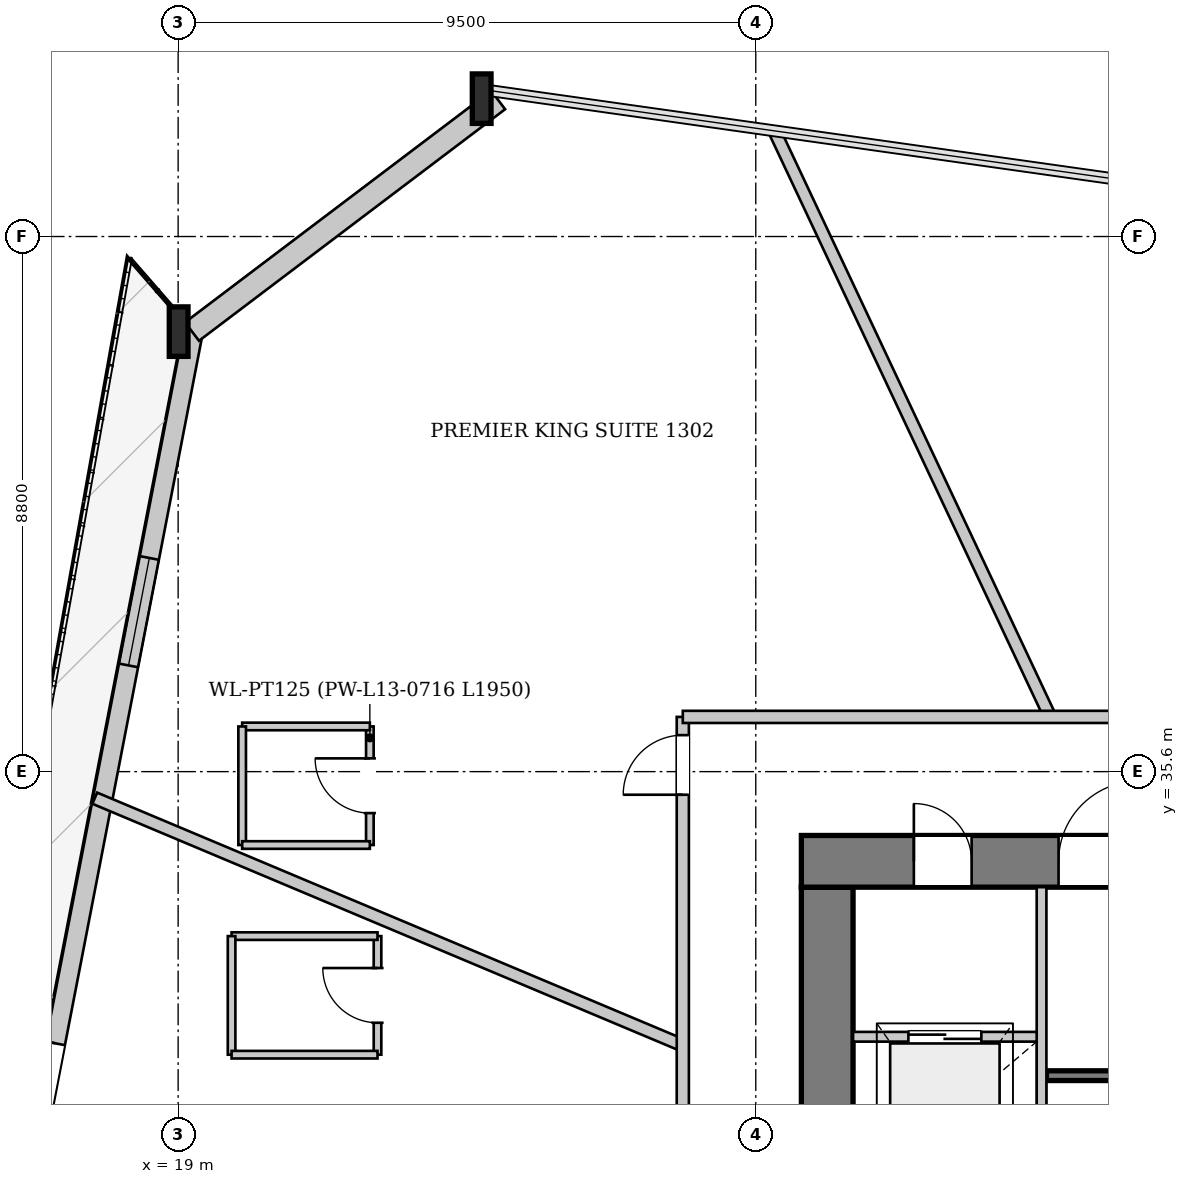
"""IFC4 building model, lengths in metres.
Left out: names, types, materials, properties, quantities, classifications, styles, units other than length and angle.
Written with IfcOpenShell. Run it as: python <this file> out.ifc"""

import sys

from ifc_helpers import new_model, si_unit, direction, frame, frame_2d, origin, origin_2d, place, context, subcontext, project, spatial, rectangle, i_section, extrude, source, transform, mapped, element, fill, save


model = new_model("IFC4")
c1 = context("Model", 3, precision=1e-05, world=origin(), true_north=direction((0.0, 1.0)))
c2 = subcontext(c1, "Body", "Model", "MODEL_VIEW")
j1 = project(units=[si_unit("LENGTHUNIT", "METRE"), si_unit("PLANEANGLEUNIT", "RADIAN")], contexts=[c1])
p1 = place(None, origin())
s1 = spatial("IfcSite", under=j1, at=p1, CompositionType="ELEMENT")
p2 = place(p1, origin())
s2 = spatial("IfcBuilding", under=s1, at=p2, CompositionType="ELEMENT")
p3 = place(p2, frame((0.0, 0.0, 54.15)))
s3 = spatial("IfcBuildingStorey", under=s2, at=p3, CompositionType="ELEMENT", Elevation=54.15)
m1 = source(origin(), c2, "Body", "SweptSolid", [
    extrude(i_section(OverallWidth=0.308, OverallDepth=0.814, WebThickness=0.021, FlangeThickness=0.04, at=origin_2d()), origin(), (0.0, 0.0, 1.0), 3.409),
])
p4 = place(p3, frame((24.148, 46.796, 0.0), z_axis=(-0.091734158476, -0.075836435461, 0.992891574758), x_axis=(0.637161279801, -0.77073049993, 0.0)))
e1 = element("IfcColumn", 1, at=p4, inside=s3, PredefinedType="COLUMN", context=c2, shape_type="MappedRepresentation", body=[
    mapped(m1, transform((0.0, 0.0, 0.0), x_axis=(1.0, 0.0, 0.0), y_axis=(0.0, 1.0, 0.0), z_axis=(0.0, 0.0, 1.0), scale=1.0)),
])
m2 = source(origin(), c2, "Body", "SweptSolid", [
    extrude(i_section(OverallWidth=0.308, OverallDepth=0.814, WebThickness=0.021, FlangeThickness=0.04, at=origin_2d()), origin(), (0.0, 0.0, 1.0), 3.405),
])
p5 = place(p3, frame((19.114, 42.988, 0.0), z_axis=(-0.061873656803, -0.08947662073, 0.994065181433), x_axis=(0.822500508627, -0.568764374155, 0.0)))
e2 = element("IfcColumn", 2, at=p5, inside=s3, PredefinedType="COLUMN", context=c2, shape_type="MappedRepresentation", body=[
    mapped(m2, transform((0.0, 0.0, 0.0), x_axis=(1.0, 0.0, 0.0), y_axis=(0.0, 1.0, 0.0), z_axis=(0.0, 0.0, 1.0), scale=1.0)),
])
p6 = place(p3, frame((15.75, 24.773, 0.0), z_axis=(0.0, 0.0, 1.0), x_axis=(0.19010756161, 0.981763268318, 0.0)))
e3 = element("IfcWall", 3, at=p6, inside=s3, PredefinedType="SOLIDWALL", context=c2, shape_type="SweptSolid", body=[
    extrude(rectangle(XDim=18.522, YDim=0.32, at=frame_2d((9.261, 0.0))), origin(), (0.0, 0.0, 1.0), 2.592),
])
p7 = place(p6, frame((5.377, 0.0, 0.0)))
e4 = element("IfcOpeningElement", 4, at=p7, cuts=e3, PredefinedType="OPENING", context=c2, shape_type="SweptSolid", body=[
    extrude(rectangle(XDim=1.1, YDim=2.3, at=frame_2d((0.55, 1.15))), frame((0.0, 0.17, 0.0), z_axis=(0.0, -1.0, 0.0), x_axis=(1.0, 0.0, 0.0)), (0.0, 0.0, 1.0), 0.34),
])
p8 = place(p6, frame((12.807, 0.0, 0.272)))
e5 = element("IfcOpeningElement", 5, at=p8, cuts=e3, PredefinedType="OPENING", context=c2, shape_type="SweptSolid", body=[
    extrude(rectangle(XDim=1.8, YDim=2.2, at=frame_2d((0.9, 1.1))), frame((0.0, 0.17, 0.0), z_axis=(0.0, -1.0, 0.0), x_axis=(1.0, 0.0, 0.0)), (0.0, 0.0, 1.0), 0.34),
])
p9 = place(p3, frame((19.228, 42.837, 0.0), z_axis=(0.0, 0.0, 1.0), x_axis=(0.797566297219, 0.6032313002, 0.0)))
e6 = element("IfcWall", 6, at=p9, inside=s3, PredefinedType="SOLIDWALL", context=c2, shape_type="SweptSolid", body=[
    extrude(rectangle(XDim=6.313, YDim=0.38, at=frame_2d((3.156, 0.0))), origin(), (0.0, 0.0, 1.0), 2.592),
])
p10 = place(p3, frame((29.675, 19.5, 0.0), z_axis=(0.0, 0.0, 1.0), x_axis=(0.0, 1.0, 0.0)))
e7 = element("IfcWall", 7, at=p10, inside=s3, PredefinedType="SHEAR", context=c2, shape_type="SweptSolid", body=[
    extrude(rectangle(XDim=14.2, YDim=0.85, at=frame_2d((7.1, 0.0))), origin(), (0.0, 0.0, 1.0), 3.3),
])
p11 = place(p10, frame((7.42, 0.0, 0.0)))
e8 = element("IfcOpeningElement", 8, at=p11, cuts=e7, PredefinedType="OPENING", context=c2, shape_type="SweptSolid", body=[
    extrude(rectangle(XDim=1.6, YDim=2.2, at=frame_2d((0.8, 1.1))), frame((0.0, 0.435, 0.0), z_axis=(0.0, -1.0, 0.0), x_axis=(1.0, 0.0, 0.0)), (0.0, 0.0, 1.0), 0.87),
])
p12 = place(p3, frame((29.25, 34.125, 0.0), z_axis=(0.0, 0.0, 1.0), x_axis=(1.0, 0.0, 0.0)))
e9 = element("IfcWall", 9, at=p12, inside=s3, PredefinedType="SHEAR", context=c2, shape_type="SweptSolid", body=[
    extrude(rectangle(XDim=17.5, YDim=0.85, at=frame_2d((8.75, 0.0))), origin(), (0.0, 0.0, 1.0), 3.3),
])
p13 = place(p12, frame((1.85, 0.0, 0.0)))
e10 = element("IfcOpeningElement", 10, at=p13, cuts=e9, PredefinedType="OPENING", context=c2, shape_type="SweptSolid", body=[
    extrude(rectangle(XDim=0.95, YDim=2.1, at=frame_2d((0.475, 1.05))), frame((0.0, 0.435, 0.0), z_axis=(0.0, -1.0, 0.0), x_axis=(1.0, 0.0, 0.0)), (0.0, 0.0, 1.0), 0.87),
])
p14 = place(p12, frame((4.23, 0.0, 0.0)))
e11 = element("IfcOpeningElement", 11, at=p14, cuts=e9, PredefinedType="OPENING", context=c2, shape_type="SweptSolid", body=[
    extrude(rectangle(XDim=1.32, YDim=2.2, at=frame_2d((0.66, 1.1))), frame((0.0, 0.435, 0.0), z_axis=(0.0, -1.0, 0.0), x_axis=(1.0, 0.0, 0.0)), (0.0, 0.0, 1.0), 0.87),
])
p15 = place(p12, frame((15.3, 0.0, 0.0)))
e12 = element("IfcOpeningElement", 12, at=p15, cuts=e9, PredefinedType="OPENING", context=c2, shape_type="SweptSolid", body=[
    extrude(rectangle(XDim=0.95, YDim=2.1, at=frame_2d((0.475, 1.05))), frame((0.0, 0.435, 0.0), z_axis=(0.0, -1.0, 0.0), x_axis=(1.0, 0.0, 0.0)), (0.0, 0.0, 1.0), 0.87),
])
p16 = place(p3, frame((33.28, 30.6, 0.0), z_axis=(0.0, 0.0, 1.0), x_axis=(1.0, 0.0, 0.0)))
e13 = element("IfcWall", 13, at=p16, inside=s3, PredefinedType="PARTITIONING", context=c2, shape_type="SweptSolid", body=[
    extrude(rectangle(XDim=7.3, YDim=0.16, at=frame_2d((3.65, 0.0))), origin(), (0.0, 0.0, 1.0), 3.3),
])
p17 = place(p3, frame((33.2, 28.44, 0.0), z_axis=(0.0, 0.0, 1.0), x_axis=(0.0, 1.0, 0.0)))
e14 = element("IfcWall", 14, at=p17, inside=s3, PredefinedType="PARTITIONING", context=c2, shape_type="SweptSolid", body=[
    extrude(rectangle(XDim=5.26, YDim=0.16, at=frame_2d((2.63, 0.0))), origin(), (0.0, 0.0, 1.0), 3.3),
])
p18 = place(p3, frame((30.1, 31.24, 0.0), z_axis=(0.0, 0.0, 1.0), x_axis=(1.0, 0.0, 0.0)))
e15 = element("IfcWall", 15, at=p18, inside=s3, PredefinedType="PARTITIONING", context=c2, shape_type="SweptSolid", body=[
    extrude(rectangle(XDim=3.02, YDim=0.16, at=frame_2d((1.51, 0.0))), origin(), (0.0, 0.0, 1.0), 3.3),
])
p19 = place(p18, frame((0.91, 0.0, 0.0)))
e16 = element("IfcOpeningElement", 16, at=p19, cuts=e15, PredefinedType="OPENING", context=c2, shape_type="SweptSolid", body=[
    extrude(rectangle(XDim=1.2, YDim=2.2, at=frame_2d((0.6, 1.1))), frame((0.0, 0.09, 0.0), z_axis=(0.0, -1.0, 0.0), x_axis=(1.0, 0.0, 0.0)), (0.0, 0.0, 1.0), 0.18),
])
p20 = place(p3, frame((33.341, 36.5, 0.0), z_axis=(0.0, 0.0, 1.0), x_axis=(-0.425771561882, 0.904830689738, 0.0)))
e17 = element("IfcWall", 17, at=p20, inside=s3, PredefinedType="PARTITIONING", context=c2, shape_type="SweptSolid", body=[
    extrude(rectangle(XDim=10.615, YDim=0.2, at=frame_2d((5.308, 0.0))), origin(), (0.0, 0.0, 1.0), 3.3),
])
p21 = place(p3, frame((27.3, 31.098, 0.0), z_axis=(0.0, 0.0, 1.0), x_axis=(-0.92186956873, 0.387500320322, 0.0)))
e18 = element("IfcWall", 18, at=p21, inside=s3, PredefinedType="PARTITIONING", context=c2, shape_type="SweptSolid", body=[
    extrude(rectangle(XDim=10.491, YDim=0.2, at=frame_2d((5.245, 0.0))), origin(), (0.0, 0.0, 1.0), 3.3),
])
p22 = place(p3, frame((22.153, 34.393, 0.0), z_axis=(0.0, 0.0, 1.0), x_axis=(0.0, 1.0, 0.0)))
e19 = element("IfcWall", 19, at=p22, inside=s3, PredefinedType="PARTITIONING", context=c2, shape_type="SweptSolid", body=[
    extrude(rectangle(XDim=1.95, YDim=0.125, at=frame_2d((0.975, 0.0))), origin(), (0.0, 0.0, 1.0), 3.3),
])
p23 = place(p22, frame((0.525, 0.0, 0.0)))
e20 = element("IfcOpeningElement", 20, at=p23, cuts=e19, PredefinedType="OPENING", context=c2, shape_type="SweptSolid", body=[
    extrude(rectangle(XDim=0.9, YDim=2.1, at=frame_2d((0.45, 1.05))), frame((0.0, 0.073, 0.0), z_axis=(0.0, -1.0, 0.0), x_axis=(1.0, 0.0, 0.0)), (0.0, 0.0, 1.0), 0.145),
])
p24 = place(p3, frame((22.153, 36.343, 0.0), z_axis=(0.0, 0.0, 1.0), x_axis=(-1.0, 0.0, 0.0)))
e21 = element("IfcWall", 21, at=p24, inside=s3, PredefinedType="PARTITIONING", context=c2, shape_type="SweptSolid", body=[
    extrude(rectangle(XDim=2.1, YDim=0.125, at=frame_2d((1.05, 0.0))), origin(), (0.0, 0.0, 1.0), 3.3),
])
p25 = place(p3, frame((20.053, 36.343, 0.0), z_axis=(0.0, 0.0, 1.0), x_axis=(0.0, -1.0, 0.0)))
e22 = element("IfcWall", 22, at=p25, inside=s3, PredefinedType="PARTITIONING", context=c2, shape_type="SweptSolid", body=[
    extrude(rectangle(XDim=1.95, YDim=0.125, at=frame_2d((0.975, 0.0))), origin(), (0.0, 0.0, 1.0), 3.3),
])
p26 = place(p3, frame((20.053, 34.393, 0.0), z_axis=(0.0, 0.0, 1.0), x_axis=(1.0, 0.0, 0.0)))
e23 = element("IfcWall", 23, at=p26, inside=s3, PredefinedType="PARTITIONING", context=c2, shape_type="SweptSolid", body=[
    extrude(rectangle(XDim=2.1, YDim=0.125, at=frame_2d((1.05, 0.0))), origin(), (0.0, 0.0, 1.0), 3.3),
])
p27 = place(p3, frame((22.279, 30.945, 0.0), z_axis=(0.0, 0.0, 1.0), x_axis=(0.0, 1.0, 0.0)))
e24 = element("IfcWall", 24, at=p27, inside=s3, PredefinedType="PARTITIONING", context=c2, shape_type="SweptSolid", body=[
    extrude(rectangle(XDim=1.95, YDim=0.125, at=frame_2d((0.975, 0.0))), origin(), (0.0, 0.0, 1.0), 3.045),
])
p28 = place(p27, frame((0.525, 0.0, 0.0)))
e25 = element("IfcOpeningElement", 25, at=p28, cuts=e24, PredefinedType="OPENING", context=c2, shape_type="SweptSolid", body=[
    extrude(rectangle(XDim=0.9, YDim=2.1, at=frame_2d((0.45, 1.05))), frame((0.0, 0.073, 0.0), z_axis=(0.0, -1.0, 0.0), x_axis=(1.0, 0.0, 0.0)), (0.0, 0.0, 1.0), 0.145),
])
p29 = place(p3, frame((22.279, 32.895, 0.0), z_axis=(0.0, 0.0, 1.0), x_axis=(-1.0, 0.0, 0.0)))
e26 = element("IfcWall", 26, at=p29, inside=s3, PredefinedType="PARTITIONING", context=c2, shape_type="SweptSolid", body=[
    extrude(rectangle(XDim=2.4, YDim=0.125, at=frame_2d((1.2, 0.0))), origin(), (0.0, 0.0, 1.0), 3.3),
])
p30 = place(p3, frame((19.879, 32.895, 0.0), z_axis=(0.0, 0.0, 1.0), x_axis=(0.0, -1.0, 0.0)))
e27 = element("IfcWall", 27, at=p30, inside=s3, PredefinedType="PARTITIONING", context=c2, shape_type="SweptSolid", body=[
    extrude(rectangle(XDim=1.95, YDim=0.125, at=frame_2d((0.975, 0.0))), origin(), (0.0, 0.0, 1.0), 3.3),
])
p31 = place(p3, frame((19.879, 30.945, 0.0), z_axis=(0.0, 0.0, 1.0), x_axis=(1.0, 0.0, 0.0)))
e28 = element("IfcWall", 28, at=p31, inside=s3, PredefinedType="PARTITIONING", context=c2, shape_type="SweptSolid", body=[
    extrude(rectangle(XDim=2.4, YDim=0.125, at=frame_2d((1.2, 0.0))), origin(), (0.0, 0.0, 1.0), 3.3),
])
p32 = place(p3, frame((27.3, 16.7, 0.0), z_axis=(0.0, 0.0, 1.0), x_axis=(0.0, 1.0, 0.0)))
e29 = element("IfcWall", 29, at=p32, inside=s3, PredefinedType="PARTITIONING", context=c2, shape_type="SweptSolid", body=[
    extrude(rectangle(XDim=19.8, YDim=0.2, at=frame_2d((9.9, 0.0))), origin(), (0.0, 0.0, 1.0), 3.3),
])
p33 = place(p32, frame((18.52, 0.0, 0.0)))
e30 = element("IfcOpeningElement", 30, at=p33, cuts=e29, PredefinedType="OPENING", context=c2, shape_type="SweptSolid", body=[
    extrude(rectangle(XDim=0.98, YDim=2.15, at=frame_2d((0.49, 1.075))), frame((0.0, 0.11, 0.0), z_axis=(0.0, -1.0, 0.0), x_axis=(1.0, 0.0, 0.0)), (0.0, 0.0, 1.0), 0.22),
])
p34 = place(p32, frame((10.654, 0.0, 0.0)))
e31 = element("IfcOpeningElement", 31, at=p34, cuts=e29, PredefinedType="OPENING", context=c2, shape_type="SweptSolid", body=[
    extrude(rectangle(XDim=0.98, YDim=2.15, at=frame_2d((0.49, 1.075))), frame((0.0, 0.11, 0.0), z_axis=(0.0, -1.0, 0.0), x_axis=(1.0, 0.0, 0.0)), (0.0, 0.0, 1.0), 0.22),
])
p35 = place(p3, frame((27.3, 36.5, 0.0), z_axis=(0.0, 0.0, 1.0), x_axis=(1.0, 0.0, 0.0)))
e32 = element("IfcWall", 32, at=p35, inside=s3, PredefinedType="PARTITIONING", context=c2, shape_type="SweptSolid", body=[
    extrude(rectangle(XDim=21.4, YDim=0.2, at=frame_2d((10.7, 0.0))), origin(), (0.0, 0.0, 1.0), 3.3),
])
p36 = place(p35, frame((20.12, 0.0, 0.0)))
e33 = element("IfcOpeningElement", 33, at=p36, cuts=e32, PredefinedType="OPENING", context=c2, shape_type="SweptSolid", body=[
    extrude(rectangle(XDim=0.98, YDim=2.15, at=frame_2d((0.49, 1.075))), frame((0.0, 0.11, 0.0), z_axis=(0.0, -1.0, 0.0), x_axis=(1.0, 0.0, 0.0)), (0.0, 0.0, 1.0), 0.22),
])
m3 = source(origin(), c2, "Body", "SweptSolid", [
    extrude(rectangle(XDim=1.1, YDim=2.3, at=frame_2d((0.55, 1.15))), frame((0.0, 0.025, 0.0), z_axis=(0.0, -1.0, 0.0), x_axis=(1.0, 0.0, 0.0)), (0.0, 0.0, 1.0), 0.05),
])
p37 = place(p7, origin())
e34 = element("IfcDoor", 34, at=p37, inside=s3, OperationType="SINGLE_SWING_RIGHT", PredefinedType="DOOR", context=c2, shape_type="MappedRepresentation", body=[
    mapped(m3, transform((0.0, 0.0, 0.0), x_axis=(1.0, 0.0, 0.0), y_axis=(0.0, 1.0, 0.0), z_axis=(0.0, 0.0, 1.0), scale=1.0)),
])
fill(e4, e34)
m4 = source(origin(), c2, "Body", "SweptSolid", [
    extrude(rectangle(XDim=1.8, YDim=2.2, at=frame_2d((0.9, 1.1))), frame((0.0, 0.03, 0.0), z_axis=(0.0, -1.0, 0.0), x_axis=(1.0, 0.0, 0.0)), (0.0, 0.0, 1.0), 0.06),
])
p38 = place(p8, origin())
e35 = element("IfcWindow", 35, at=p38, inside=s3, PartitioningType="SINGLE_PANEL", PredefinedType="WINDOW", context=c2, shape_type="MappedRepresentation", body=[
    mapped(m4, transform((0.0, 0.0, 0.0), x_axis=(1.0, 0.0, 0.0), y_axis=(0.0, 1.0, 0.0), z_axis=(0.0, 0.0, 1.0), scale=1.0)),
])
fill(e5, e35)
m5 = source(origin(), c2, "Body", "SweptSolid", [
    extrude(rectangle(XDim=0.95, YDim=2.1, at=frame_2d((0.475, 1.05))), frame((0.0, 0.025, 0.0), z_axis=(0.0, -1.0, 0.0), x_axis=(1.0, 0.0, 0.0)), (0.0, 0.0, 1.0), 0.05),
])
p39 = place(p13, origin())
e36 = element("IfcDoor", 36, at=p39, inside=s3, OperationType="SINGLE_SWING_LEFT", PredefinedType="DOOR", context=c2, shape_type="MappedRepresentation", body=[
    mapped(m5, transform((0.0, 0.0, 0.0), x_axis=(1.0, 0.0, 0.0), y_axis=(0.0, 1.0, 0.0), z_axis=(0.0, 0.0, 1.0), scale=1.0)),
])
fill(e10, e36)
m6 = source(origin(), c2, "Body", "SweptSolid", [
    extrude(rectangle(XDim=1.32, YDim=2.2, at=frame_2d((0.66, 1.1))), frame((0.0, 0.025, 0.0), z_axis=(0.0, -1.0, 0.0), x_axis=(1.0, 0.0, 0.0)), (0.0, 0.0, 1.0), 0.05),
])
p40 = place(p14, origin())
e37 = element("IfcDoor", 37, at=p40, inside=s3, OperationType="SINGLE_SWING_RIGHT", PredefinedType="DOOR", context=c2, shape_type="MappedRepresentation", body=[
    mapped(m6, transform((0.0, 0.0, 0.0), x_axis=(1.0, 0.0, 0.0), y_axis=(0.0, 1.0, 0.0), z_axis=(0.0, 0.0, 1.0), scale=1.0)),
])
fill(e11, e37)
m7 = source(origin(), c2, "Body", "SweptSolid", [
    extrude(rectangle(XDim=1.2, YDim=2.2, at=frame_2d((0.6, 1.1))), frame((0.0, 0.025, 0.0), z_axis=(0.0, -1.0, 0.0), x_axis=(1.0, 0.0, 0.0)), (0.0, 0.0, 1.0), 0.05),
])
p41 = place(p19, origin())
e38 = element("IfcDoor", 38, at=p41, inside=s3, OperationType="DOUBLE_DOOR_SLIDING", PredefinedType="DOOR", context=c2, shape_type="MappedRepresentation", body=[
    mapped(m7, transform((0.0, 0.0, 0.0), x_axis=(1.0, 0.0, 0.0), y_axis=(0.0, 1.0, 0.0), z_axis=(0.0, 0.0, 1.0), scale=1.0)),
])
fill(e16, e38)
m8 = source(origin(), c2, "Body", "SweptSolid", [
    extrude(rectangle(XDim=0.9, YDim=2.1, at=frame_2d((0.45, 1.05))), frame((0.0, 0.025, 0.0), z_axis=(0.0, -1.0, 0.0), x_axis=(1.0, 0.0, 0.0)), (0.0, 0.0, 1.0), 0.05),
])
p42 = place(p23, origin())
e39 = element("IfcDoor", 39, at=p42, inside=s3, OperationType="SINGLE_SWING_RIGHT", PredefinedType="DOOR", context=c2, shape_type="MappedRepresentation", body=[
    mapped(m8, transform((0.0, 0.0, 0.0), x_axis=(1.0, 0.0, 0.0), y_axis=(0.0, 1.0, 0.0), z_axis=(0.0, 0.0, 1.0), scale=1.0)),
])
fill(e20, e39)
p43 = place(p28, origin())
e40 = element("IfcDoor", 40, at=p43, inside=s3, OperationType="SINGLE_SWING_RIGHT", PredefinedType="DOOR", context=c2, shape_type="MappedRepresentation", body=[
    mapped(m8, transform((0.0, 0.0, 0.0), x_axis=(1.0, 0.0, 0.0), y_axis=(0.0, 1.0, 0.0), z_axis=(0.0, 0.0, 1.0), scale=1.0)),
])
fill(e25, e40)
m9 = source(origin(), c2, "Body", "SweptSolid", [
    extrude(rectangle(XDim=0.98, YDim=2.15, at=frame_2d((0.49, 1.075))), frame((0.0, 0.025, 0.0), z_axis=(0.0, -1.0, 0.0), x_axis=(1.0, 0.0, 0.0)), (0.0, 0.0, 1.0), 0.05),
])
p44 = place(p33, origin())
e41 = element("IfcDoor", 41, at=p44, inside=s3, OperationType="SINGLE_SWING_LEFT", PredefinedType="DOOR", context=c2, shape_type="MappedRepresentation", body=[
    mapped(m9, transform((0.0, 0.0, 0.0), x_axis=(1.0, 0.0, 0.0), y_axis=(0.0, 1.0, 0.0), z_axis=(0.0, 0.0, 1.0), scale=1.0)),
])
fill(e30, e41)
save(model, sys.argv[1])
